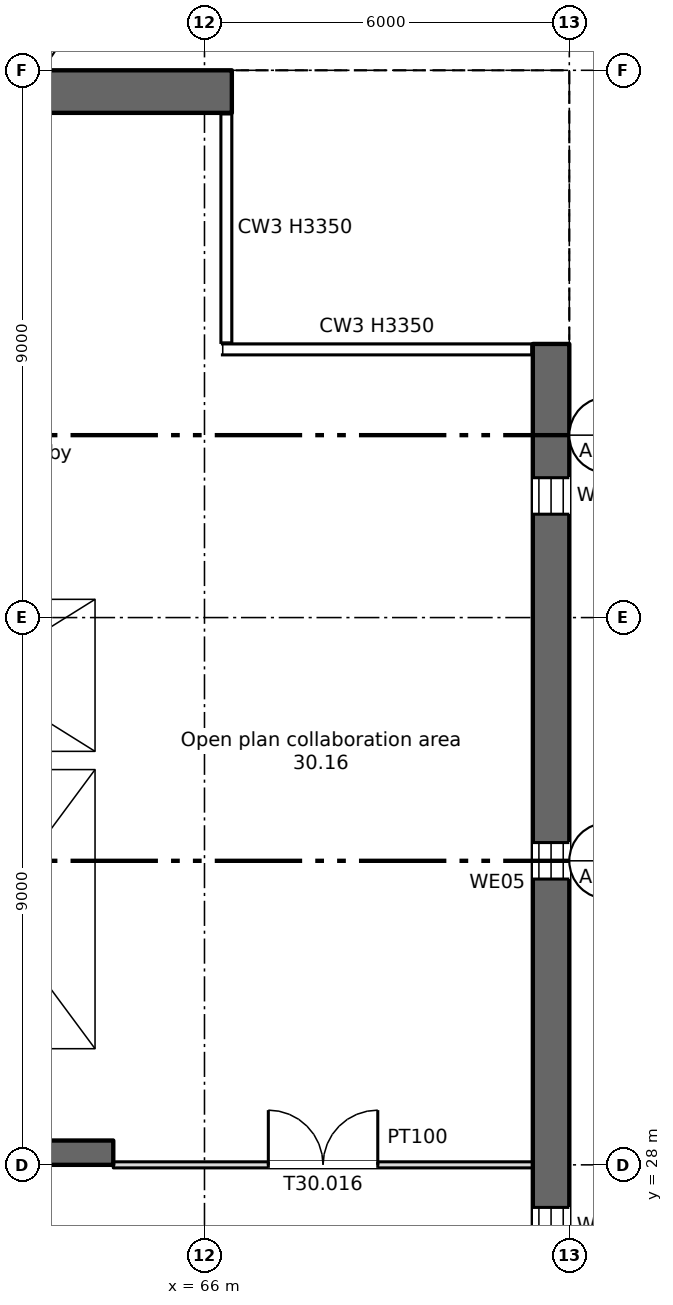
"""IFC4 building model, lengths in metres.
Left out: names, types, materials, properties, quantities, classifications, styles, units other than length and angle.
Written with IfcOpenShell. Run it as: python <this file> out.ifc"""

import sys

from ifc_helpers import new_model, si_unit, direction, frame, frame_2d, origin, place, context, subcontext, project, spatial, rectangle, extrude, element, fill, save


model = new_model("IFC4")
c1 = context("Model", 3, precision=1e-05, world=origin(), true_north=direction((0.0, 1.0)))
c2 = subcontext(c1, "Body", "Model", "MODEL_VIEW")
j1 = project(units=[si_unit("LENGTHUNIT", "METRE"), si_unit("PLANEANGLEUNIT", "RADIAN")], contexts=[c1])
p1 = place(None, origin())
s1 = spatial("IfcSite", under=j1, at=p1, CompositionType="ELEMENT")
p2 = place(p1, origin())
s2 = spatial("IfcBuilding", under=s1, at=p2, CompositionType="ELEMENT")
p3 = place(p2, frame((0.0, 0.0, 211.75)))
s3 = spatial("IfcBuildingStorey", under=s2, at=p3, CompositionType="ELEMENT", Elevation=211.75)
p4 = place(p3, frame((71.7, 7.5, 0.0), z_axis=(0.0, 0.0, 1.0), x_axis=(0.0, 1.0, 0.0)))
e1 = element("IfcWall", 1, at=p4, inside=s3, PredefinedType="SHEAR", context=c2, shape_type="SweptSolid", body=[
    extrude(rectangle(XDim=34.0, YDim=0.6, at=frame_2d((17.0, 0.0))), origin(), (0.0, 0.0, 1.0), 3.35),
])
p5 = place(p4, frame((1.2, 0.0, 0.6)))
e2 = element("IfcOpeningElement", 2, at=p5, cuts=e1, PredefinedType="OPENING", context=c2, shape_type="SweptSolid", body=[
    extrude(rectangle(XDim=0.6, YDim=2.4, at=frame_2d((0.3, 1.2))), frame((0.0, 0.31, 0.0), z_axis=(0.0, -1.0, 0.0), x_axis=(1.0, 0.0, 0.0)), (0.0, 0.0, 1.0), 0.62),
])
p6 = place(p4, frame((7.2, 0.0, 0.6)))
e3 = element("IfcOpeningElement", 3, at=p6, cuts=e1, PredefinedType="OPENING", context=c2, shape_type="SweptSolid", body=[
    extrude(rectangle(XDim=0.6, YDim=2.4, at=frame_2d((0.3, 1.2))), frame((0.0, 0.31, 0.0), z_axis=(0.0, -1.0, 0.0), x_axis=(1.0, 0.0, 0.0)), (0.0, 0.0, 1.0), 0.62),
])
p7 = place(p4, frame((13.2, 0.0, 0.6)))
e4 = element("IfcOpeningElement", 4, at=p7, cuts=e1, PredefinedType="OPENING", context=c2, shape_type="SweptSolid", body=[
    extrude(rectangle(XDim=0.6, YDim=2.4, at=frame_2d((0.3, 1.2))), frame((0.0, 0.31, 0.0), z_axis=(0.0, -1.0, 0.0), x_axis=(1.0, 0.0, 0.0)), (0.0, 0.0, 1.0), 0.62),
])
p8 = place(p4, frame((19.2, 0.0, 0.6)))
e5 = element("IfcOpeningElement", 5, at=p8, cuts=e1, PredefinedType="OPENING", context=c2, shape_type="SweptSolid", body=[
    extrude(rectangle(XDim=0.6, YDim=2.4, at=frame_2d((0.3, 1.2))), frame((0.0, 0.31, 0.0), z_axis=(0.0, -1.0, 0.0), x_axis=(1.0, 0.0, 0.0)), (0.0, 0.0, 1.0), 0.62),
])
p9 = place(p4, frame((25.2, 0.0, 0.6)))
e6 = element("IfcOpeningElement", 6, at=p9, cuts=e1, PredefinedType="OPENING", context=c2, shape_type="SweptSolid", body=[
    extrude(rectangle(XDim=0.6, YDim=2.4, at=frame_2d((0.3, 1.2))), frame((0.0, 0.31, 0.0), z_axis=(0.0, -1.0, 0.0), x_axis=(1.0, 0.0, 0.0)), (0.0, 0.0, 1.0), 0.62),
])
p10 = place(p4, frame((31.2, 0.0, 0.6)))
e7 = element("IfcOpeningElement", 7, at=p10, cuts=e1, PredefinedType="OPENING", context=c2, shape_type="SweptSolid", body=[
    extrude(rectangle(XDim=0.6, YDim=2.4, at=frame_2d((0.3, 1.2))), frame((0.0, 0.31, 0.0), z_axis=(0.0, -1.0, 0.0), x_axis=(1.0, 0.0, 0.0)), (0.0, 0.0, 1.0), 0.62),
])
p11 = place(p3, frame((11.55, 45.65, 0.0), z_axis=(0.0, 0.0, 1.0), x_axis=(1.0, 0.0, 0.0)))
e8 = element("IfcWall", 8, at=p11, inside=s3, PredefinedType="SHEAR", context=c2, shape_type="SweptSolid", body=[
    extrude(rectangle(XDim=54.9, YDim=0.7, at=frame_2d((27.45, 0.0))), origin(), (0.0, 0.0, 1.0), 3.35),
])
p12 = place(p3, frame((6.6, 28.2, 0.0), z_axis=(0.0, 0.0, 1.0), x_axis=(1.0, 0.0, 0.0)))
e9 = element("IfcWall", 9, at=p12, inside=s3, PredefinedType="SHEAR", context=c2, shape_type="SweptSolid", body=[
    extrude(rectangle(XDim=57.9, YDim=0.4, at=frame_2d((28.95, 0.0))), origin(), (0.0, 0.0, 1.0), 3.35),
])
p13 = place(p12, frame((12.663, 0.0, 0.0)))
e10 = element("IfcOpeningElement", 10, at=p13, cuts=e9, PredefinedType="OPENING", context=c2, shape_type="SweptSolid", body=[
    extrude(rectangle(XDim=0.9, YDim=2.1, at=frame_2d((0.45, 1.05))), frame((0.0, 0.21, 0.0), z_axis=(0.0, -1.0, 0.0), x_axis=(1.0, 0.0, 0.0)), (0.0, 0.0, 1.0), 0.42),
])
p14 = place(p12, frame((15.238, 0.0, 0.0)))
e11 = element("IfcOpeningElement", 11, at=p14, cuts=e9, PredefinedType="OPENING", context=c2, shape_type="SweptSolid", body=[
    extrude(rectangle(XDim=0.9, YDim=2.1, at=frame_2d((0.45, 1.05))), frame((0.0, 0.21, 0.0), z_axis=(0.0, -1.0, 0.0), x_axis=(1.0, 0.0, 0.0)), (0.0, 0.0, 1.0), 0.42),
])
p15 = place(p12, frame((49.95, 0.0, 0.0)))
e12 = element("IfcOpeningElement", 12, at=p15, cuts=e9, PredefinedType="OPENING", context=c2, shape_type="SweptSolid", body=[
    extrude(rectangle(XDim=0.9, YDim=2.1, at=frame_2d((0.45, 1.05))), frame((0.0, 0.21, 0.0), z_axis=(0.0, -1.0, 0.0), x_axis=(1.0, 0.0, 0.0)), (0.0, 0.0, 1.0), 0.42),
])
p16 = place(p12, frame((0.663, 0.0, 0.0)))
e13 = element("IfcOpeningElement", 13, at=p16, cuts=e9, PredefinedType="OPENING", context=c2, shape_type="SweptSolid", body=[
    extrude(rectangle(XDim=0.9, YDim=2.1, at=frame_2d((0.45, 1.05))), frame((0.0, 0.21, 0.0), z_axis=(0.0, -1.0, 0.0), x_axis=(1.0, 0.0, 0.0)), (0.0, 0.0, 1.0), 0.42),
])
p17 = place(p12, frame((2.238, 0.0, 0.0)))
e14 = element("IfcOpeningElement", 14, at=p17, cuts=e9, PredefinedType="OPENING", context=c2, shape_type="SweptSolid", body=[
    extrude(rectangle(XDim=0.9, YDim=2.1, at=frame_2d((0.45, 1.05))), frame((0.0, 0.21, 0.0), z_axis=(0.0, -1.0, 0.0), x_axis=(1.0, 0.0, 0.0)), (0.0, 0.0, 1.0), 0.42),
])
p18 = place(p12, frame((4.8, 0.0, 0.0)))
e15 = element("IfcOpeningElement", 15, at=p18, cuts=e9, PredefinedType="OPENING", context=c2, shape_type="SweptSolid", body=[
    extrude(rectangle(XDim=1.2, YDim=2.1, at=frame_2d((0.6, 1.05))), frame((0.0, 0.21, 0.0), z_axis=(0.0, -1.0, 0.0), x_axis=(1.0, 0.0, 0.0)), (0.0, 0.0, 1.0), 0.42),
])
p19 = place(p12, frame((31.8, 0.0, 0.0)))
e16 = element("IfcOpeningElement", 16, at=p19, cuts=e9, PredefinedType="OPENING", context=c2, shape_type="SweptSolid", body=[
    extrude(rectangle(XDim=1.2, YDim=2.1, at=frame_2d((0.6, 1.05))), frame((0.0, 0.21, 0.0), z_axis=(0.0, -1.0, 0.0), x_axis=(1.0, 0.0, 0.0)), (0.0, 0.0, 1.0), 0.42),
])
p20 = place(p12, frame((55.3, 0.0, 0.0)))
e17 = element("IfcOpeningElement", 17, at=p20, cuts=e9, PredefinedType="OPENING", context=c2, shape_type="SweptSolid", body=[
    extrude(rectangle(XDim=1.2, YDim=2.1, at=frame_2d((0.6, 1.05))), frame((0.0, 0.21, 0.0), z_axis=(0.0, -1.0, 0.0), x_axis=(1.0, 0.0, 0.0)), (0.0, 0.0, 1.0), 0.42),
])
p21 = place(p12, frame((21.8, 0.0, 0.0)))
e18 = element("IfcOpeningElement", 18, at=p21, cuts=e9, PredefinedType="OPENING", context=c2, shape_type="SweptSolid", body=[
    extrude(rectangle(XDim=1.2, YDim=2.1, at=frame_2d((0.6, 1.05))), frame((0.0, 0.21, 0.0), z_axis=(0.0, -1.0, 0.0), x_axis=(1.0, 0.0, 0.0)), (0.0, 0.0, 1.0), 0.42),
])
p22 = place(p12, frame((41.8, 0.0, 0.0)))
e19 = element("IfcOpeningElement", 19, at=p22, cuts=e9, PredefinedType="OPENING", context=c2, shape_type="SweptSolid", body=[
    extrude(rectangle(XDim=1.2, YDim=2.1, at=frame_2d((0.6, 1.05))), frame((0.0, 0.21, 0.0), z_axis=(0.0, -1.0, 0.0), x_axis=(1.0, 0.0, 0.0)), (0.0, 0.0, 1.0), 0.42),
])
p23 = place(p12, frame((24.95, 0.0, 0.0)))
e20 = element("IfcOpeningElement", 20, at=p23, cuts=e9, PredefinedType="OPENING", context=c2, shape_type="SweptSolid", body=[
    extrude(rectangle(XDim=2.4, YDim=2.1, at=frame_2d((1.2, 1.05))), frame((0.0, 0.21, 0.0), z_axis=(0.0, -1.0, 0.0), x_axis=(1.0, 0.0, 0.0)), (0.0, 0.0, 1.0), 0.42),
])
p24 = place(p12, frame((37.45, 0.0, 0.0)))
e21 = element("IfcOpeningElement", 21, at=p24, cuts=e9, PredefinedType="OPENING", context=c2, shape_type="SweptSolid", body=[
    extrude(rectangle(XDim=2.4, YDim=2.1, at=frame_2d((1.2, 1.05))), frame((0.0, 0.21, 0.0), z_axis=(0.0, -1.0, 0.0), x_axis=(1.0, 0.0, 0.0)), (0.0, 0.0, 1.0), 0.42),
])
p25 = place(p12, frame((8.1, 0.0, 0.0)))
e22 = element("IfcOpeningElement", 22, at=p25, cuts=e9, PredefinedType="OPENING", context=c2, shape_type="SweptSolid", body=[
    extrude(rectangle(XDim=2.4, YDim=2.1, at=frame_2d((1.2, 1.05))), frame((0.0, 0.21, 0.0), z_axis=(0.0, -1.0, 0.0), x_axis=(1.0, 0.0, 0.0)), (0.0, 0.0, 1.0), 0.42),
])
p26 = place(p12, frame((28.95, 0.0, 0.0)))
e23 = element("IfcOpeningElement", 23, at=p26, cuts=e9, PredefinedType="OPENING", context=c2, shape_type="SweptSolid", body=[
    extrude(rectangle(XDim=0.9, YDim=2.1, at=frame_2d((0.45, 1.05))), frame((0.0, 0.21, 0.0), z_axis=(0.0, -1.0, 0.0), x_axis=(1.0, 0.0, 0.0)), (0.0, 0.0, 1.0), 0.42),
])
p27 = place(p12, frame((34.95, 0.0, 0.0)))
e24 = element("IfcOpeningElement", 24, at=p27, cuts=e9, PredefinedType="OPENING", context=c2, shape_type="SweptSolid", body=[
    extrude(rectangle(XDim=0.9, YDim=2.1, at=frame_2d((0.45, 1.05))), frame((0.0, 0.21, 0.0), z_axis=(0.0, -1.0, 0.0), x_axis=(1.0, 0.0, 0.0)), (0.0, 0.0, 1.0), 0.42),
])
p28 = place(p3, frame((64.35, 34.8, 0.0), z_axis=(0.0, 0.0, 1.0), x_axis=(0.0, 1.0, 0.0)))
e25 = element("IfcWall", 25, at=p28, inside=s3, PredefinedType="SHEAR", context=c2, shape_type="SweptSolid", body=[
    extrude(rectangle(XDim=10.5, YDim=0.3, at=frame_2d((5.25, 0.0))), origin(), (0.0, 0.0, 1.0), 3.35),
])
p29 = place(p3, frame((64.35, 28.4, 0.0), z_axis=(0.0, 0.0, 1.0), x_axis=(0.0, 1.0, 0.0)))
e26 = element("IfcWall", 26, at=p29, inside=s3, PredefinedType="SHEAR", context=c2, shape_type="SweptSolid", body=[
    extrude(rectangle(XDim=6.1, YDim=0.3, at=frame_2d((3.05, 0.0))), origin(), (0.0, 0.0, 1.0), 3.35),
])
p30 = place(p3, frame((60.2, 34.65, 0.0), z_axis=(0.0, 0.0, 1.0), x_axis=(1.0, 0.0, 0.0)))
e27 = element("IfcWall", 27, at=p30, inside=s3, PredefinedType="SHEAR", context=c2, shape_type="SweptSolid", body=[
    extrude(rectangle(XDim=4.3, YDim=0.3, at=frame_2d((2.15, 0.0))), origin(), (0.0, 0.0, 1.0), 3.35),
])
p31 = place(p3, frame((60.2, 37.45, 0.0), z_axis=(0.0, 0.0, 1.0), x_axis=(1.0, 0.0, 0.0)))
e28 = element("IfcWall", 28, at=p31, inside=s3, PredefinedType="SHEAR", context=c2, shape_type="SweptSolid", body=[
    extrude(rectangle(XDim=4.0, YDim=0.3, at=frame_2d((2.0, 0.0))), origin(), (0.0, 0.0, 1.0), 3.35),
])
p32 = place(p31, frame((1.45, 0.0, 0.0)))
e29 = element("IfcOpeningElement", 29, at=p32, cuts=e28, PredefinedType="OPENING", context=c2, shape_type="SweptSolid", body=[
    extrude(rectangle(XDim=1.1, YDim=2.1, at=frame_2d((0.55, 1.05))), frame((0.0, 0.16, 0.0), z_axis=(0.0, -1.0, 0.0), x_axis=(1.0, 0.0, 0.0)), (0.0, 0.0, 1.0), 0.32),
])
p33 = place(p3, frame((64.5, 28.0, 0.0), z_axis=(0.0, 0.0, 1.0), x_axis=(1.0, 0.0, 0.0)))
e30 = element("IfcWall", 30, at=p33, inside=s3, PredefinedType="PARTITIONING", context=c2, shape_type="SweptSolid", body=[
    extrude(rectangle(XDim=6.9, YDim=0.1, at=frame_2d((3.45, 0.0))), origin(), (0.0, 0.0, 1.0), 3.35),
])
p34 = place(p33, frame((2.55, 0.0, 0.0)))
e31 = element("IfcOpeningElement", 31, at=p34, cuts=e30, PredefinedType="OPENING", context=c2, shape_type="SweptSolid", body=[
    extrude(rectangle(XDim=1.8, YDim=2.1, at=frame_2d((0.9, 1.05))), frame((0.0, 0.06, 0.0), z_axis=(0.0, -1.0, 0.0), x_axis=(1.0, 0.0, 0.0)), (0.0, 0.0, 1.0), 0.12),
])
p35 = place(p8, origin())
e32 = element("IfcWindow", 32, at=p35, inside=s3, PartitioningType="SINGLE_PANEL", PredefinedType="WINDOW", context=c2, shape_type="SweptSolid", body=[
    extrude(rectangle(XDim=0.6, YDim=2.4, at=frame_2d((0.3, 1.2))), frame((0.0, 0.03, 0.0), z_axis=(0.0, -1.0, 0.0), x_axis=(1.0, 0.0, 0.0)), (0.0, 0.0, 1.0), 0.06),
])
fill(e5, e32)
p36 = place(p9, origin())
e33 = element("IfcWindow", 33, at=p36, inside=s3, PartitioningType="SINGLE_PANEL", PredefinedType="WINDOW", context=c2, shape_type="SweptSolid", body=[
    extrude(rectangle(XDim=0.6, YDim=2.4, at=frame_2d((0.3, 1.2))), frame((0.0, 0.03, 0.0), z_axis=(0.0, -1.0, 0.0), x_axis=(1.0, 0.0, 0.0)), (0.0, 0.0, 1.0), 0.06),
])
fill(e6, e33)
p37 = place(p10, origin())
e34 = element("IfcWindow", 34, at=p37, inside=s3, PartitioningType="SINGLE_PANEL", PredefinedType="WINDOW", context=c2, shape_type="SweptSolid", body=[
    extrude(rectangle(XDim=0.6, YDim=2.4, at=frame_2d((0.3, 1.2))), frame((0.0, 0.03, 0.0), z_axis=(0.0, -1.0, 0.0), x_axis=(1.0, 0.0, 0.0)), (0.0, 0.0, 1.0), 0.06),
])
fill(e7, e34)
p38 = place(p34, origin())
e35 = element("IfcDoor", 35, at=p38, inside=s3, OperationType="DOUBLE_DOOR_SINGLE_SWING", PredefinedType="DOOR", context=c2, shape_type="SweptSolid", body=[
    extrude(rectangle(XDim=1.8, YDim=2.1, at=frame_2d((0.9, 1.05))), frame((0.0, 0.025, 0.0), z_axis=(0.0, -1.0, 0.0), x_axis=(1.0, 0.0, 0.0)), (0.0, 0.0, 1.0), 0.05),
])
fill(e31, e35)
save(model, sys.argv[1])
